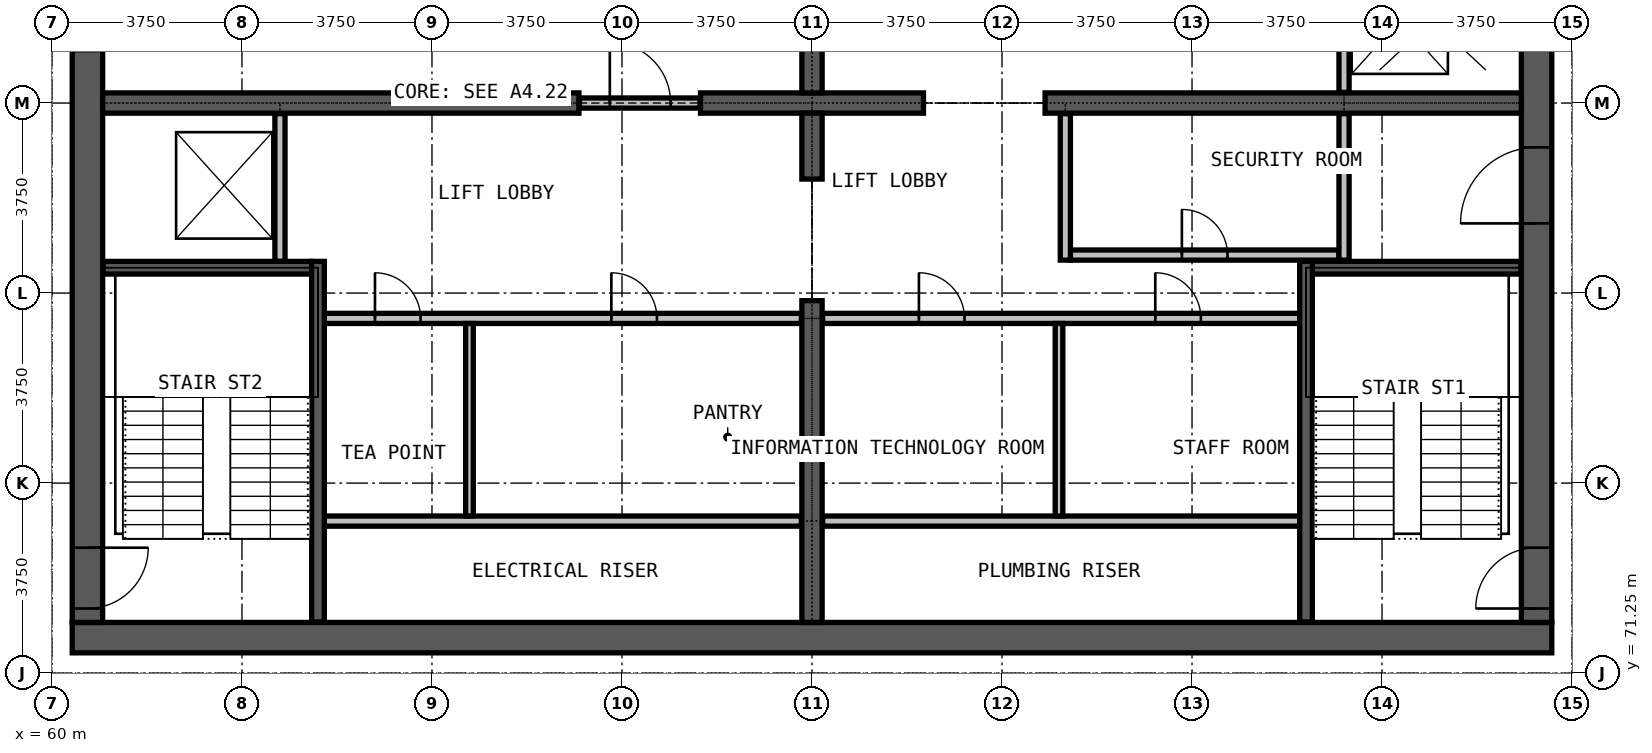
"""IFC4 building model, lengths in metres.
Left out: names, types, materials, properties, quantities, classifications, styles, units other than length and angle.
Written with IfcOpenShell. Run it as: python <this file> out.ifc"""

import sys

from ifc_helpers import new_model, si_unit, direction, frame, frame_2d, origin, place, context, subcontext, project, spatial, rectangle, extrude, element, fill, save


model = new_model("IFC4")
c1 = context("Model", 3, precision=1e-05, world=origin(), true_north=direction((0.0, 1.0)))
c2 = subcontext(c1, "Body", "Model", "MODEL_VIEW")
j1 = project(units=[si_unit("LENGTHUNIT", "METRE"), si_unit("PLANEANGLEUNIT", "RADIAN")], contexts=[c1])
p1 = place(None, origin())
s1 = spatial("IfcSite", under=j1, at=p1, CompositionType="ELEMENT")
p2 = place(p1, origin())
s2 = spatial("IfcBuilding", under=s1, at=p2, CompositionType="ELEMENT")
p3 = place(p2, frame((0.0, 0.0, 242.7)))
s3 = spatial("IfcBuildingStorey", under=s2, at=p3, CompositionType="ELEMENT", Elevation=242.7)
p4 = place(p3, frame((60.4, 71.95, 0.0), z_axis=(0.0, 0.0, 1.0), x_axis=(1.0, 0.0, 0.0)))
e1 = element("IfcWall", 1, at=p4, inside=s3, PredefinedType="SHEAR", context=c2, shape_type="SweptSolid", body=[
    extrude(rectangle(XDim=29.2, YDim=0.6, at=frame_2d((14.6, 0.0))), origin(), (0.0, 0.0, 1.0), 3.6),
])
p5 = place(p3, frame((89.3, 72.25, 0.0), z_axis=(0.0, 0.0, 1.0), x_axis=(0.0, 1.0, 0.0)))
e2 = element("IfcWall", 2, at=p5, inside=s3, PredefinedType="SHEAR", context=c2, shape_type="SweptSolid", body=[
    extrude(rectangle(XDim=20.5, YDim=0.6, at=frame_2d((10.25, 0.0))), origin(), (0.0, 0.0, 1.0), 3.6),
])
p6 = place(p5, frame((0.275, 0.0, 0.0)))
e3 = element("IfcOpeningElement", 3, at=p6, cuts=e2, PredefinedType="OPENING", context=c2, shape_type="SweptSolid", body=[
    extrude(rectangle(XDim=1.2, YDim=2.2, at=frame_2d((0.6, 1.1))), frame((0.0, 0.31, 0.0), z_axis=(0.0, -1.0, 0.0), x_axis=(1.0, 0.0, 0.0)), (0.0, 0.0, 1.0), 0.62),
])
p7 = place(p5, frame((13.775, 0.0, 0.0)))
e4 = element("IfcOpeningElement", 4, at=p7, cuts=e2, PredefinedType="OPENING", context=c2, shape_type="SweptSolid", body=[
    extrude(rectangle(XDim=1.2, YDim=2.2, at=frame_2d((0.6, 1.1))), frame((0.0, 0.31, 0.0), z_axis=(0.0, -1.0, 0.0), x_axis=(1.0, 0.0, 0.0)), (0.0, 0.0, 1.0), 0.62),
])
p8 = place(p5, frame((7.875, 0.0, 0.0)))
e5 = element("IfcOpeningElement", 5, at=p8, cuts=e2, PredefinedType="OPENING", context=c2, shape_type="SweptSolid", body=[
    extrude(rectangle(XDim=1.5, YDim=2.2, at=frame_2d((0.75, 1.1))), frame((0.0, 0.31, 0.0), z_axis=(0.0, -1.0, 0.0), x_axis=(1.0, 0.0, 0.0)), (0.0, 0.0, 1.0), 0.62),
])
p9 = place(p3, frame((60.7, 92.75, 0.0), z_axis=(0.0, 0.0, 1.0), x_axis=(0.0, -1.0, 0.0)))
e6 = element("IfcWall", 6, at=p9, inside=s3, PredefinedType="SHEAR", context=c2, shape_type="SweptSolid", body=[
    extrude(rectangle(XDim=20.5, YDim=0.6, at=frame_2d((10.25, 0.0))), origin(), (0.0, 0.0, 1.0), 3.6),
])
p10 = place(p9, frame((19.025, 0.0, 0.0)))
e7 = element("IfcOpeningElement", 7, at=p10, cuts=e6, PredefinedType="OPENING", context=c2, shape_type="SweptSolid", body=[
    extrude(rectangle(XDim=1.2, YDim=2.2, at=frame_2d((0.6, 1.1))), frame((0.0, 0.31, 0.0), z_axis=(0.0, -1.0, 0.0), x_axis=(1.0, 0.0, 0.0)), (0.0, 0.0, 1.0), 0.62),
])
p11 = place(p9, frame((8.025, 0.0, 0.0)))
e8 = element("IfcOpeningElement", 8, at=p11, cuts=e6, PredefinedType="OPENING", context=c2, shape_type="SweptSolid", body=[
    extrude(rectangle(XDim=1.2, YDim=2.2, at=frame_2d((0.6, 1.1))), frame((0.0, 0.31, 0.0), z_axis=(0.0, -1.0, 0.0), x_axis=(1.0, 0.0, 0.0)), (0.0, 0.0, 1.0), 0.62),
])
p12 = place(p3, frame((61.0, 82.5, 0.0), z_axis=(0.0, 0.0, 1.0), x_axis=(1.0, 0.0, 0.0)))
e9 = element("IfcWall", 9, at=p12, inside=s3, PredefinedType="SHEAR", context=c2, shape_type="SweptSolid", body=[
    extrude(rectangle(XDim=9.4, YDim=0.4, at=frame_2d((4.7, 0.0))), origin(), (0.0, 0.0, 1.0), 3.6),
])
p13 = place(p3, frame((72.8, 82.5, 0.0), z_axis=(0.0, 0.0, 1.0), x_axis=(1.0, 0.0, 0.0)))
e10 = element("IfcWall", 10, at=p13, inside=s3, PredefinedType="SHEAR", context=c2, shape_type="SweptSolid", body=[
    extrude(rectangle(XDim=4.4, YDim=0.4, at=frame_2d((2.2, 0.0))), origin(), (0.0, 0.0, 1.0), 3.6),
])
p14 = place(p3, frame((79.6, 82.5, 0.0), z_axis=(0.0, 0.0, 1.0), x_axis=(1.0, 0.0, 0.0)))
e11 = element("IfcWall", 11, at=p14, inside=s3, PredefinedType="SHEAR", context=c2, shape_type="SweptSolid", body=[
    extrude(rectangle(XDim=9.4, YDim=0.4, at=frame_2d((4.7, 0.0))), origin(), (0.0, 0.0, 1.0), 3.6),
])
p15 = place(p3, frame((75.0, 72.25, 0.0), z_axis=(0.0, 0.0, 1.0), x_axis=(0.0, 1.0, 0.0)))
e12 = element("IfcWall", 12, at=p15, inside=s3, PredefinedType="SHEAR", context=c2, shape_type="SweptSolid", body=[
    extrude(rectangle(XDim=6.35, YDim=0.4, at=frame_2d((3.175, 0.0))), origin(), (0.0, 0.0, 1.0), 3.6),
])
for number, where, z_axis, x_axis in (
    (13, (75.0, 81.0, 0.0), (0.0, 0.0, 1.0), (0.0, 1.0, 0.0)),
    (14, (75.0, 82.7, 0.0), (0.0, 0.0, 1.0), (0.0, 1.0, 0.0)),
):
    element("IfcWall", number, at=place(p3, frame(where, z_axis=z_axis, x_axis=x_axis)), inside=s3, PredefinedType="SHEAR", context=c2, shape_type="SweptSolid", body=[
        extrude(rectangle(XDim=1.3, YDim=0.4, at=frame_2d((0.65, 0.0))), origin(), (0.0, 0.0, 1.0), 3.6),
    ])
for number, where, z_axis, x_axis in (
    (15, (65.375, 74.25, 0.0), (0.0, 0.0, 1.0), (1.0, 0.0, 0.0)),
    (16, (75.21, 74.25, 0.0), (0.0, 0.0, 1.0), (1.0, 0.0, 0.0)),
):
    element("IfcWall", number, at=place(p3, frame(where, z_axis=z_axis, x_axis=x_axis)), inside=s3, PredefinedType="PARTITIONING", context=c2, shape_type="SweptSolid", body=[
        extrude(rectangle(XDim=9.415, YDim=0.2, at=frame_2d((4.708, 0.0))), origin(), (0.0, 0.0, 1.0), 3.3),
    ])
p16 = place(p3, frame((65.375, 78.25, 0.0), z_axis=(0.0, 0.0, 1.0), x_axis=(1.0, 0.0, 0.0)))
e17 = element("IfcWall", 17, at=p16, inside=s3, PredefinedType="PARTITIONING", context=c2, shape_type="SweptSolid", body=[
    extrude(rectangle(XDim=9.415, YDim=0.2, at=frame_2d((4.708, 0.0))), origin(), (0.0, 0.0, 1.0), 3.3),
])
p17 = place(p16, frame((1.0, 0.0, 0.0)))
e18 = element("IfcOpeningElement", 18, at=p17, cuts=e17, PredefinedType="OPENING", context=c2, shape_type="SweptSolid", body=[
    extrude(rectangle(XDim=0.9, YDim=2.2, at=frame_2d((0.45, 1.1))), frame((0.0, 0.11, 0.0), z_axis=(0.0, -1.0, 0.0), x_axis=(1.0, 0.0, 0.0)), (0.0, 0.0, 1.0), 0.22),
])
p18 = place(p16, frame((5.665, 0.0, 0.0)))
e19 = element("IfcOpeningElement", 19, at=p18, cuts=e17, PredefinedType="OPENING", context=c2, shape_type="SweptSolid", body=[
    extrude(rectangle(XDim=0.9, YDim=2.2, at=frame_2d((0.45, 1.1))), frame((0.0, 0.11, 0.0), z_axis=(0.0, -1.0, 0.0), x_axis=(1.0, 0.0, 0.0)), (0.0, 0.0, 1.0), 0.22),
])
p19 = place(p3, frame((75.21, 78.25, 0.0), z_axis=(0.0, 0.0, 1.0), x_axis=(1.0, 0.0, 0.0)))
e20 = element("IfcWall", 20, at=p19, inside=s3, PredefinedType="PARTITIONING", context=c2, shape_type="SweptSolid", body=[
    extrude(rectangle(XDim=9.415, YDim=0.2, at=frame_2d((4.708, 0.0))), origin(), (0.0, 0.0, 1.0), 3.3),
])
p20 = place(p19, frame((1.9, 0.0, 0.0)))
e21 = element("IfcOpeningElement", 21, at=p20, cuts=e20, PredefinedType="OPENING", context=c2, shape_type="SweptSolid", body=[
    extrude(rectangle(XDim=0.9, YDim=2.2, at=frame_2d((0.45, 1.1))), frame((0.0, 0.11, 0.0), z_axis=(0.0, -1.0, 0.0), x_axis=(1.0, 0.0, 0.0)), (0.0, 0.0, 1.0), 0.22),
])
p21 = place(p19, frame((6.565, 0.0, 0.0)))
e22 = element("IfcOpeningElement", 22, at=p21, cuts=e20, PredefinedType="OPENING", context=c2, shape_type="SweptSolid", body=[
    extrude(rectangle(XDim=0.9, YDim=2.2, at=frame_2d((0.45, 1.1))), frame((0.0, 0.11, 0.0), z_axis=(0.0, -1.0, 0.0), x_axis=(1.0, 0.0, 0.0)), (0.0, 0.0, 1.0), 0.22),
])
p22 = place(p3, frame((80.1, 79.5, 0.0), z_axis=(0.0, 0.0, 1.0), x_axis=(1.0, 0.0, 0.0)))
e23 = element("IfcWall", 23, at=p22, inside=s3, PredefinedType="PARTITIONING", context=c2, shape_type="SweptSolid", body=[
    extrude(rectangle(XDim=5.3, YDim=0.2, at=frame_2d((2.65, 0.0))), origin(), (0.0, 0.0, 1.0), 3.3),
])
p23 = place(p22, frame((2.2, 0.0, 0.0)))
e24 = element("IfcOpeningElement", 24, at=p23, cuts=e23, PredefinedType="OPENING", context=c2, shape_type="SweptSolid", body=[
    extrude(rectangle(XDim=0.9, YDim=2.2, at=frame_2d((0.45, 1.1))), frame((0.0, 0.11, 0.0), z_axis=(0.0, -1.0, 0.0), x_axis=(1.0, 0.0, 0.0)), (0.0, 0.0, 1.0), 0.22),
])
p24 = place(p3, frame((70.41, 82.5, 0.0), z_axis=(0.0, 0.0, 1.0), x_axis=(1.0, 0.0, 0.0)))
e25 = element("IfcWall", 25, at=p24, inside=s3, PredefinedType="PARTITIONING", context=c2, shape_type="SweptSolid", body=[
    extrude(rectangle(XDim=2.38, YDim=0.2, at=frame_2d((1.19, 0.0))), origin(), (0.0, 0.0, 1.0), 2.4),
])
p25 = place(p24, frame((0.6, 0.0, 0.0)))
e26 = element("IfcOpeningElement", 26, at=p25, cuts=e25, PredefinedType="OPENING", context=c2, shape_type="SweptSolid", body=[
    extrude(rectangle(XDim=1.2, YDim=2.2, at=frame_2d((0.6, 1.1))), frame((0.0, 0.11, 0.0), z_axis=(0.0, -1.0, 0.0), x_axis=(1.0, 0.0, 0.0)), (0.0, 0.0, 1.0), 0.22),
])
for number, where, z_axis, x_axis in (
    (27, (80.0, 79.4, 0.0), (0.0, 0.0, 1.0), (0.0, 1.0, 0.0)),
    (28, (85.5, 79.4, 0.0), (0.0, 0.0, 1.0), (0.0, 1.0, 0.0)),
):
    element("IfcWall", number, at=place(p3, frame(where, z_axis=z_axis, x_axis=x_axis)), inside=s3, PredefinedType="PARTITIONING", context=c2, shape_type="SweptSolid", body=[
        extrude(rectangle(XDim=2.89, YDim=0.2, at=frame_2d((1.445, 0.0))), origin(), (0.0, 0.0, 1.0), 3.3),
    ])
for number, where, z_axis, x_axis in (
    (29, (68.24, 74.35, 0.0), (0.0, 0.0, 1.0), (0.0, 1.0, 0.0)),
    (30, (79.875, 74.35, 0.0), (0.0, 0.0, 1.0), (0.0, 1.0, 0.0)),
):
    element("IfcWall", number, at=place(p3, frame(where, z_axis=z_axis, x_axis=x_axis)), inside=s3, PredefinedType="PARTITIONING", context=c2, shape_type="SweptSolid", body=[
        extrude(rectangle(XDim=3.8, YDim=0.15, at=frame_2d((1.9, 0.0))), origin(), (0.0, 0.0, 1.0), 3.3),
    ])
p26 = place(p3, frame((64.5, 79.375, 0.0), z_axis=(0.0, 0.0, 1.0), x_axis=(0.0, 1.0, 0.0)))
e31 = element("IfcWall", 31, at=p26, inside=s3, PredefinedType="PARTITIONING", context=c2, shape_type="SweptSolid", body=[
    extrude(rectangle(XDim=2.915, YDim=0.2, at=frame_2d((1.458, 0.0))), origin(), (0.0, 0.0, 1.0), 3.3),
])
p27 = place(p3, frame((85.5, 82.71, 0.0), z_axis=(0.0, 0.0, 1.0), x_axis=(0.0, 1.0, 0.0)))
e32 = element("IfcWall", 32, at=p27, inside=s3, PredefinedType="PARTITIONING", context=c2, shape_type="SweptSolid", body=[
    extrude(rectangle(XDim=2.915, YDim=0.2, at=frame_2d((1.458, 0.0))), origin(), (0.0, 0.0, 1.0), 3.3),
])
p28 = place(p27, frame((0.9, 0.0, 0.0)))
e33 = element("IfcOpeningElement", 33, at=p28, cuts=e32, PredefinedType="OPENING", context=c2, shape_type="SweptSolid", body=[
    extrude(rectangle(XDim=1.1, YDim=2.2, at=frame_2d((0.55, 1.1))), frame((0.0, 0.11, 0.0), z_axis=(0.0, -1.0, 0.0), x_axis=(1.0, 0.0, 0.0)), (0.0, 0.0, 1.0), 0.22),
])
for number, where, z_axis, x_axis in (
    (34, (61.01, 79.25, 0.0), (0.0, 0.0, 1.0), (1.0, 0.0, 0.0)),
    (35, (84.875, 79.25, 0.0), (0.0, 0.0, 1.0), (1.0, 0.0, 0.0)),
):
    element("IfcWall", number, at=place(p3, frame(where, z_axis=z_axis, x_axis=x_axis)), inside=s3, PredefinedType="PARTITIONING", context=c2, shape_type="SweptSolid", body=[
        extrude(rectangle(XDim=4.115, YDim=0.25, at=frame_2d((2.058, 0.0))), origin(), (0.0, 0.0, 1.0), 3.3),
    ])
for number, where, z_axis, x_axis in (
    (36, (65.25, 72.26, 0.0), (0.0, 0.0, 1.0), (0.0, 1.0, 0.0)),
    (37, (84.75, 72.26, 0.0), (0.0, 0.0, 1.0), (0.0, 1.0, 0.0)),
):
    element("IfcWall", number, at=place(p3, frame(where, z_axis=z_axis, x_axis=x_axis)), inside=s3, PredefinedType="PARTITIONING", context=c2, shape_type="SweptSolid", body=[
        extrude(rectangle(XDim=7.115, YDim=0.25, at=frame_2d((3.558, 0.0))), origin(), (0.0, 0.0, 1.0), 3.3),
    ])
p29 = place(p25, origin())
e38 = element("IfcDoor", 38, at=p29, inside=s3, OperationType="SINGLE_SWING_LEFT", PredefinedType="DOOR", context=c2, shape_type="SweptSolid", body=[
    extrude(rectangle(XDim=1.2, YDim=2.2, at=frame_2d((0.6, 1.1))), frame((0.0, 0.025, 0.0), z_axis=(0.0, -1.0, 0.0), x_axis=(1.0, 0.0, 0.0)), (0.0, 0.0, 1.0), 0.05),
])
fill(e26, e38)
p30 = place(p6, origin())
e39 = element("IfcDoor", 39, at=p30, inside=s3, OperationType="SINGLE_SWING_LEFT", PredefinedType="DOOR", context=c2, shape_type="SweptSolid", body=[
    extrude(rectangle(XDim=1.2, YDim=2.2, at=frame_2d((0.6, 1.1))), frame((0.0, 0.025, 0.0), z_axis=(0.0, -1.0, 0.0), x_axis=(1.0, 0.0, 0.0)), (0.0, 0.0, 1.0), 0.05),
])
fill(e3, e39)
p31 = place(p10, origin())
e40 = element("IfcDoor", 40, at=p31, inside=s3, OperationType="SINGLE_SWING_LEFT", PredefinedType="DOOR", context=c2, shape_type="SweptSolid", body=[
    extrude(rectangle(XDim=1.2, YDim=2.2, at=frame_2d((0.6, 1.1))), frame((0.0, 0.025, 0.0), z_axis=(0.0, -1.0, 0.0), x_axis=(1.0, 0.0, 0.0)), (0.0, 0.0, 1.0), 0.05),
])
fill(e7, e40)
p32 = place(p8, origin())
e41 = element("IfcDoor", 41, at=p32, inside=s3, OperationType="DOUBLE_DOOR_SINGLE_SWING", PredefinedType="DOOR", context=c2, shape_type="SweptSolid", body=[
    extrude(rectangle(XDim=1.5, YDim=2.2, at=frame_2d((0.75, 1.1))), frame((0.0, 0.025, 0.0), z_axis=(0.0, -1.0, 0.0), x_axis=(1.0, 0.0, 0.0)), (0.0, 0.0, 1.0), 0.05),
])
fill(e5, e41)
p33 = place(p23, origin())
e42 = element("IfcDoor", 42, at=p33, inside=s3, OperationType="SINGLE_SWING_LEFT", PredefinedType="DOOR", context=c2, shape_type="SweptSolid", body=[
    extrude(rectangle(XDim=0.9, YDim=2.2, at=frame_2d((0.45, 1.1))), frame((0.0, 0.025, 0.0), z_axis=(0.0, -1.0, 0.0), x_axis=(1.0, 0.0, 0.0)), (0.0, 0.0, 1.0), 0.05),
])
fill(e24, e42)
p34 = place(p17, origin())
e43 = element("IfcDoor", 43, at=p34, inside=s3, OperationType="SINGLE_SWING_LEFT", PredefinedType="DOOR", context=c2, shape_type="SweptSolid", body=[
    extrude(rectangle(XDim=0.9, YDim=2.2, at=frame_2d((0.45, 1.1))), frame((0.0, 0.025, 0.0), z_axis=(0.0, -1.0, 0.0), x_axis=(1.0, 0.0, 0.0)), (0.0, 0.0, 1.0), 0.05),
])
fill(e18, e43)
p35 = place(p18, origin())
e44 = element("IfcDoor", 44, at=p35, inside=s3, OperationType="SINGLE_SWING_LEFT", PredefinedType="DOOR", context=c2, shape_type="SweptSolid", body=[
    extrude(rectangle(XDim=0.9, YDim=2.2, at=frame_2d((0.45, 1.1))), frame((0.0, 0.025, 0.0), z_axis=(0.0, -1.0, 0.0), x_axis=(1.0, 0.0, 0.0)), (0.0, 0.0, 1.0), 0.05),
])
fill(e19, e44)
p36 = place(p20, origin())
e45 = element("IfcDoor", 45, at=p36, inside=s3, OperationType="SINGLE_SWING_RIGHT", PredefinedType="DOOR", context=c2, shape_type="SweptSolid", body=[
    extrude(rectangle(XDim=0.9, YDim=2.2, at=frame_2d((0.45, 1.1))), frame((0.0, 0.025, 0.0), z_axis=(0.0, -1.0, 0.0), x_axis=(1.0, 0.0, 0.0)), (0.0, 0.0, 1.0), 0.05),
])
fill(e21, e45)
p37 = place(p21, origin())
e46 = element("IfcDoor", 46, at=p37, inside=s3, OperationType="SINGLE_SWING_LEFT", PredefinedType="DOOR", context=c2, shape_type="SweptSolid", body=[
    extrude(rectangle(XDim=0.9, YDim=2.2, at=frame_2d((0.45, 1.1))), frame((0.0, 0.025, 0.0), z_axis=(0.0, -1.0, 0.0), x_axis=(1.0, 0.0, 0.0)), (0.0, 0.0, 1.0), 0.05),
])
fill(e22, e46)
save(model, sys.argv[1])
